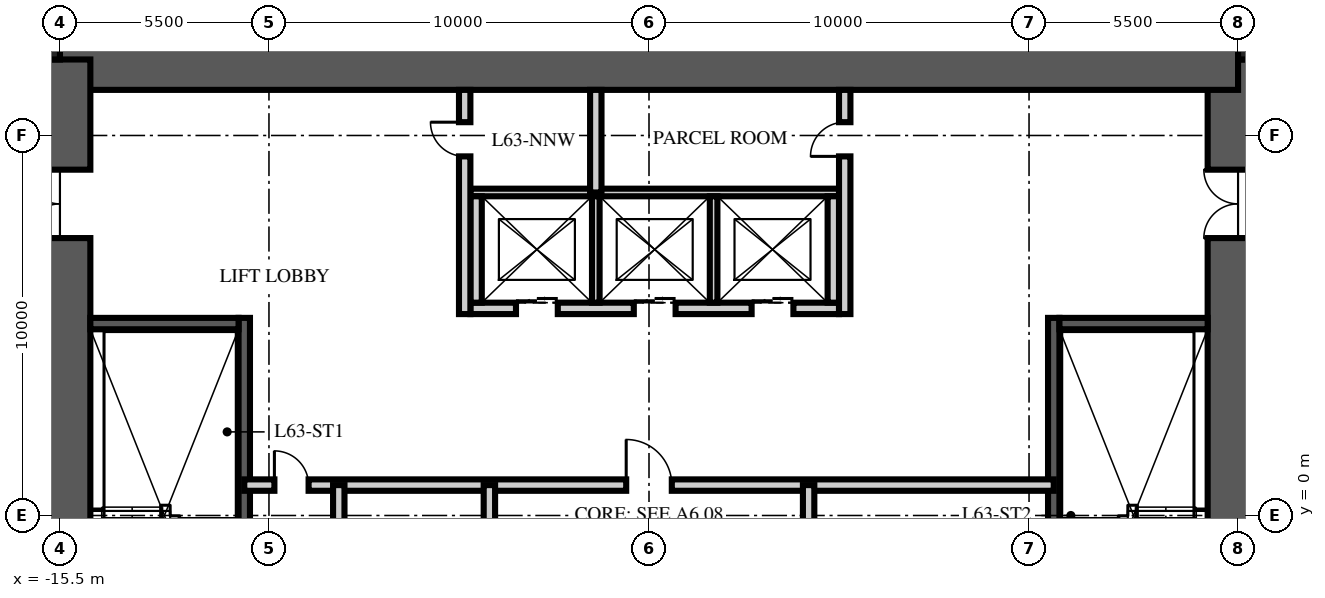
"""IFC4 building model, lengths in metres.
Left out: names, types, materials, properties, quantities, classifications, styles, units other than length and angle.
Written with IfcOpenShell. Run it as: python <this file> out.ifc"""

import sys

from ifc_helpers import new_model, si_unit, direction, frame, frame_2d, origin, origin_2d, place, context, subcontext, project, spatial, rectangle, extrude, element, fill, save


model = new_model("IFC4")
c1 = context("Model", 3, precision=1e-05, world=origin(), true_north=direction((0.0, 1.0)))
c2 = subcontext(c1, "Body", "Model", "MODEL_VIEW")
j1 = project(units=[si_unit("LENGTHUNIT", "METRE"), si_unit("PLANEANGLEUNIT", "RADIAN")], contexts=[c1])
p1 = place(None, origin())
s1 = spatial("IfcSite", under=j1, at=p1, CompositionType="ELEMENT")
p2 = place(p1, origin())
s2 = spatial("IfcBuilding", under=s1, at=p2, CompositionType="ELEMENT")
p3 = place(p2, frame((0.0, 0.0, 252.0)))
s3 = spatial("IfcBuildingStorey", under=s2, at=p3, CompositionType="ELEMENT", Elevation=252.0)
p4 = place(p3, frame((15.5, -12.0, -0.25), z_axis=(0.0, 0.0, 1.0), x_axis=(0.0, 1.0, 0.0)))
e1 = element("IfcWall", 1, at=p4, inside=s3, PredefinedType="SHEAR", context=c2, shape_type="SweptSolid", body=[
    extrude(rectangle(XDim=24.0, YDim=1.6, at=frame_2d((12.0, 0.0))), origin(), (0.0, 0.0, 1.0), 3.75),
])
p5 = place(p4, frame((3.2, 0.0, 0.25)))
e2 = element("IfcOpeningElement", 2, at=p5, cuts=e1, PredefinedType="OPENING", context=c2, shape_type="SweptSolid", body=[
    extrude(rectangle(XDim=1.2, YDim=2.1, at=frame_2d((0.6, 1.05))), frame((0.0, 0.81, 0.0), z_axis=(0.0, -1.0, 0.0), x_axis=(1.0, 0.0, 0.0)), (0.0, 0.0, 1.0), 1.62),
])
p6 = place(p4, frame((19.3, 0.0, 0.25)))
e3 = element("IfcOpeningElement", 3, at=p6, cuts=e1, PredefinedType="OPENING", context=c2, shape_type="SweptSolid", body=[
    extrude(rectangle(XDim=1.8, YDim=2.1, at=frame_2d((0.9, 1.05))), frame((0.0, 0.81, 0.0), z_axis=(0.0, -1.0, 0.0), x_axis=(1.0, 0.0, 0.0)), (0.0, 0.0, 1.0), 1.62),
])
p7 = place(p3, frame((-15.5, 12.0, -0.25), z_axis=(0.0, 0.0, 1.0), x_axis=(1.0, 0.0, 0.0)))
e4 = element("IfcWall", 4, at=p7, inside=s3, PredefinedType="SHEAR", context=c2, shape_type="SweptSolid", body=[
    extrude(rectangle(XDim=31.0, YDim=1.6, at=frame_2d((15.5, 0.0))), origin(), (0.0, 0.0, 1.0), 3.75),
])
p8 = place(p3, frame((-15.5, -12.0, -0.25), z_axis=(0.0, 0.0, 1.0), x_axis=(0.0, 1.0, 0.0)))
e5 = element("IfcWall", 5, at=p8, inside=s3, PredefinedType="SHEAR", context=c2, shape_type="SweptSolid", body=[
    extrude(rectangle(XDim=24.0, YDim=1.6, at=frame_2d((12.0, 0.0))), origin(), (0.0, 0.0, 1.0), 3.75),
])
p9 = place(p8, frame((3.2, 0.0, 0.25)))
e6 = element("IfcOpeningElement", 6, at=p9, cuts=e5, PredefinedType="OPENING", context=c2, shape_type="SweptSolid", body=[
    extrude(rectangle(XDim=1.2, YDim=2.1, at=frame_2d((0.6, 1.05))), frame((0.0, 0.81, 0.0), z_axis=(0.0, -1.0, 0.0), x_axis=(1.0, 0.0, 0.0)), (0.0, 0.0, 1.0), 1.62),
])
p10 = place(p8, frame((19.3, 0.0, 0.25)))
e7 = element("IfcOpeningElement", 7, at=p10, cuts=e5, PredefinedType="OPENING", context=c2, shape_type="SweptSolid", body=[
    extrude(rectangle(XDim=1.8, YDim=2.1, at=frame_2d((0.9, 1.05))), frame((0.0, 0.81, 0.0), z_axis=(0.0, -1.0, 0.0), x_axis=(1.0, 0.0, 0.0)), (0.0, 0.0, 1.0), 1.62),
])
for number, where, z_axis, x_axis in (
    (8, (15.9, 12.4, -0.25), (0.0, 0.0, 1.0), (1.0, 0.0, 0.0)),
    (9, (-15.9, 12.4, -0.25), (0.0, 0.0, 1.0), (1.0, 0.0, 0.0)),
):
    element("IfcColumn", number, at=place(p3, frame(where, z_axis=z_axis, x_axis=x_axis)), inside=s3, PredefinedType="COLUMN", context=c2, shape_type="SweptSolid", body=[
        extrude(rectangle(XDim=0.8, YDim=0.8, at=origin_2d()), origin(), (0.0, 0.0, 1.0), 3.75),
    ])
p11 = place(p3, frame((-10.65, -4.9, 0.0), z_axis=(0.0, 0.0, 1.0), x_axis=(0.0, 1.0, 0.0)))
e10 = element("IfcWall", 10, at=p11, inside=s3, PredefinedType="SOLIDWALL", context=c2, shape_type="SweptSolid", body=[
    extrude(rectangle(XDim=10.1, YDim=0.3, at=frame_2d((5.05, 0.0))), origin(), (0.0, 0.0, 1.0), 3.5),
])
p12 = place(p3, frame((-14.7, 5.05, 0.0), z_axis=(0.0, 0.0, 1.0), x_axis=(1.0, 0.0, 0.0)))
e11 = element("IfcWall", 11, at=p12, inside=s3, PredefinedType="SOLIDWALL", context=c2, shape_type="SweptSolid", body=[
    extrude(rectangle(XDim=3.9, YDim=0.3, at=frame_2d((1.95, 0.0))), origin(), (0.0, 0.0, 1.0), 3.5),
])
p13 = place(p3, frame((10.65, -4.9, 0.0), z_axis=(0.0, 0.0, 1.0), x_axis=(0.0, 1.0, 0.0)))
e12 = element("IfcWall", 12, at=p13, inside=s3, PredefinedType="SOLIDWALL", context=c2, shape_type="SweptSolid", body=[
    extrude(rectangle(XDim=10.1, YDim=0.3, at=frame_2d((5.05, 0.0))), origin(), (0.0, 0.0, 1.0), 3.5),
])
p14 = place(p3, frame((14.7, 5.05, 0.0), z_axis=(0.0, 0.0, 1.0), x_axis=(-1.0, 0.0, 0.0)))
e13 = element("IfcWall", 13, at=p14, inside=s3, PredefinedType="SOLIDWALL", context=c2, shape_type="SweptSolid", body=[
    extrude(rectangle(XDim=3.9, YDim=0.3, at=frame_2d((1.95, 0.0))), origin(), (0.0, 0.0, 1.0), 3.5),
])
p15 = place(p3, frame((-4.7, 5.45, 0.0), z_axis=(0.0, 0.0, 1.0), x_axis=(1.0, 0.0, 0.0)))
e14 = element("IfcWall", 14, at=p15, inside=s3, PredefinedType="PARTITIONING", context=c2, shape_type="SweptSolid", body=[
    extrude(rectangle(XDim=9.7, YDim=0.3, at=frame_2d((4.85, 0.0))), origin(), (0.0, 0.0, 1.0), 3.5),
])
p16 = place(p15, frame((1.2, 0.0, 0.0)))
e15 = element("IfcOpeningElement", 15, at=p16, cuts=e14, PredefinedType="OPENING", context=c2, shape_type="SweptSolid", body=[
    extrude(rectangle(XDim=1.1, YDim=2.1, at=frame_2d((0.55, 1.05))), frame((0.0, 0.16, 0.0), z_axis=(0.0, -1.0, 0.0), x_axis=(1.0, 0.0, 0.0)), (0.0, 0.0, 1.0), 0.32),
])
p17 = place(p15, frame((4.3, 0.0, 0.0)))
e16 = element("IfcOpeningElement", 16, at=p17, cuts=e14, PredefinedType="OPENING", context=c2, shape_type="SweptSolid", body=[
    extrude(rectangle(XDim=1.1, YDim=2.1, at=frame_2d((0.55, 1.05))), frame((0.0, 0.16, 0.0), z_axis=(0.0, -1.0, 0.0), x_axis=(1.0, 0.0, 0.0)), (0.0, 0.0, 1.0), 0.32),
])
p18 = place(p15, frame((7.4, 0.0, 0.0)))
e17 = element("IfcOpeningElement", 17, at=p18, cuts=e14, PredefinedType="OPENING", context=c2, shape_type="SweptSolid", body=[
    extrude(rectangle(XDim=1.1, YDim=2.1, at=frame_2d((0.55, 1.05))), frame((0.0, 0.16, 0.0), z_axis=(0.0, -1.0, 0.0), x_axis=(1.0, 0.0, 0.0)), (0.0, 0.0, 1.0), 0.32),
])
p19 = place(p3, frame((-4.7, 8.5, 0.0), z_axis=(0.0, 0.0, 1.0), x_axis=(1.0, 0.0, 0.0)))
e18 = element("IfcWall", 18, at=p19, inside=s3, PredefinedType="PARTITIONING", context=c2, shape_type="SweptSolid", body=[
    extrude(rectangle(XDim=9.7, YDim=0.2, at=frame_2d((4.85, 0.0))), origin(), (0.0, 0.0, 1.0), 3.5),
])
for number, where, z_axis, x_axis in (
    (19, (-4.55, 5.6, 0.0), (0.0, 0.0, 1.0), (0.0, 1.0, 0.0)),
    (20, (4.85, 5.6, 0.0), (0.0, 0.0, 1.0), (0.0, 1.0, 0.0)),
):
    element("IfcWall", number, at=place(p3, frame(where, z_axis=z_axis, x_axis=x_axis)), inside=s3, PredefinedType="PARTITIONING", context=c2, shape_type="SweptSolid", body=[
        extrude(rectangle(XDim=2.8, YDim=0.3, at=frame_2d((1.4, 0.0))), origin(), (0.0, 0.0, 1.0), 3.5),
    ])
for number, where, z_axis, x_axis in (
    (21, (-1.4, 5.6, 0.0), (0.0, 0.0, 1.0), (0.0, 1.0, 0.0)),
    (22, (1.7, 5.6, 0.0), (0.0, 0.0, 1.0), (0.0, 1.0, 0.0)),
):
    element("IfcWall", number, at=place(p3, frame(where, z_axis=z_axis, x_axis=x_axis)), inside=s3, PredefinedType="PARTITIONING", context=c2, shape_type="SweptSolid", body=[
        extrude(rectangle(XDim=2.8, YDim=0.2, at=frame_2d((1.4, 0.0))), origin(), (0.0, 0.0, 1.0), 3.5),
    ])
p20 = place(p3, frame((-10.65, 0.8, 0.0), z_axis=(0.0, 0.0, 1.0), x_axis=(1.0, 0.0, 0.0)))
e23 = element("IfcWall", 23, at=p20, inside=s3, PredefinedType="PARTITIONING", context=c2, shape_type="SweptSolid", body=[
    extrude(rectangle(XDim=21.3, YDim=0.3, at=frame_2d((10.65, 0.0))), origin(), (0.0, 0.0, 1.0), 3.5),
])
p21 = place(p20, frame((10.05, 0.0, 0.0)))
e24 = element("IfcOpeningElement", 24, at=p21, cuts=e23, PredefinedType="OPENING", context=c2, shape_type="SweptSolid", body=[
    extrude(rectangle(XDim=1.2, YDim=2.1, at=frame_2d((0.6, 1.05))), frame((0.0, 0.16, 0.0), z_axis=(0.0, -1.0, 0.0), x_axis=(1.0, 0.0, 0.0)), (0.0, 0.0, 1.0), 0.32),
])
p22 = place(p20, frame((0.793, 0.0, 0.0)))
e25 = element("IfcOpeningElement", 25, at=p22, cuts=e23, PredefinedType="OPENING", context=c2, shape_type="SweptSolid", body=[
    extrude(rectangle(XDim=0.9, YDim=2.1, at=frame_2d((0.45, 1.05))), frame((0.0, 0.16, 0.0), z_axis=(0.0, -1.0, 0.0), x_axis=(1.0, 0.0, 0.0)), (0.0, 0.0, 1.0), 0.32),
])
p23 = place(p3, frame((-4.2, -6.65, 0.0), z_axis=(0.0, 0.0, 1.0), x_axis=(0.0, 1.0, 0.0)))
e26 = element("IfcWall", 26, at=p23, inside=s3, PredefinedType="PARTITIONING", context=c2, shape_type="SweptSolid", body=[
    extrude(rectangle(XDim=7.45, YDim=0.3, at=frame_2d((3.725, 0.0))), origin(), (0.0, 0.0, 1.0), 3.5),
])
p24 = place(p23, frame((3.275, 0.0, 0.0)))
e27 = element("IfcOpeningElement", 27, at=p24, cuts=e26, PredefinedType="OPENING", context=c2, shape_type="SweptSolid", body=[
    extrude(rectangle(XDim=0.9, YDim=2.1, at=frame_2d((0.45, 1.05))), frame((0.0, 0.16, 0.0), z_axis=(0.0, -1.0, 0.0), x_axis=(1.0, 0.0, 0.0)), (0.0, 0.0, 1.0), 0.32),
])
p25 = place(p3, frame((4.2, -6.65, 0.0), z_axis=(0.0, 0.0, 1.0), x_axis=(0.0, 1.0, 0.0)))
e28 = element("IfcWall", 28, at=p25, inside=s3, PredefinedType="PARTITIONING", context=c2, shape_type="SweptSolid", body=[
    extrude(rectangle(XDim=7.45, YDim=0.3, at=frame_2d((3.725, 0.0))), origin(), (0.0, 0.0, 1.0), 3.5),
])
p26 = place(p25, frame((0.866, 0.0, 0.0)))
e29 = element("IfcOpeningElement", 29, at=p26, cuts=e28, PredefinedType="OPENING", context=c2, shape_type="SweptSolid", body=[
    extrude(rectangle(XDim=0.9, YDim=2.1, at=frame_2d((0.45, 1.05))), frame((0.0, 0.16, 0.0), z_axis=(0.0, -1.0, 0.0), x_axis=(1.0, 0.0, 0.0)), (0.0, 0.0, 1.0), 0.32),
])
p27 = place(p25, frame((4.591, 0.0, 0.0)))
e30 = element("IfcOpeningElement", 30, at=p27, cuts=e28, PredefinedType="OPENING", context=c2, shape_type="SweptSolid", body=[
    extrude(rectangle(XDim=0.9, YDim=2.1, at=frame_2d((0.45, 1.05))), frame((0.0, 0.16, 0.0), z_axis=(0.0, -1.0, 0.0), x_axis=(1.0, 0.0, 0.0)), (0.0, 0.0, 1.0), 0.32),
])
p28 = place(p3, frame((-8.163, -6.65, 0.0), z_axis=(0.0, 0.0, 1.0), x_axis=(0.0, 1.0, 0.0)))
e31 = element("IfcWall", 31, at=p28, inside=s3, PredefinedType="PARTITIONING", context=c2, shape_type="SweptSolid", body=[
    extrude(rectangle(XDim=7.45, YDim=0.3, at=frame_2d((3.725, 0.0))), origin(), (0.0, 0.0, 1.0), 3.5),
])
p29 = place(p3, frame((-4.85, 5.3, 0.0), z_axis=(0.0, 0.0, 1.0), x_axis=(0.0, 1.0, 0.0)))
e32 = element("IfcWall", 32, at=p29, inside=s3, PredefinedType="PARTITIONING", context=c2, shape_type="SweptSolid", body=[
    extrude(rectangle(XDim=5.9, YDim=0.3, at=frame_2d((2.95, 0.0))), origin(), (0.0, 0.0, 1.0), 3.5),
])
p30 = place(p29, frame((4.15, 0.0, 0.0)))
e33 = element("IfcOpeningElement", 33, at=p30, cuts=e32, PredefinedType="OPENING", context=c2, shape_type="SweptSolid", body=[
    extrude(rectangle(XDim=0.9, YDim=2.1, at=frame_2d((0.45, 1.05))), frame((0.0, 0.16, 0.0), z_axis=(0.0, -1.0, 0.0), x_axis=(1.0, 0.0, 0.0)), (0.0, 0.0, 1.0), 0.32),
])
p31 = place(p3, frame((5.15, 5.3, 0.0), z_axis=(0.0, 0.0, 1.0), x_axis=(0.0, 1.0, 0.0)))
e34 = element("IfcWall", 34, at=p31, inside=s3, PredefinedType="PARTITIONING", context=c2, shape_type="SweptSolid", body=[
    extrude(rectangle(XDim=5.9, YDim=0.3, at=frame_2d((2.95, 0.0))), origin(), (0.0, 0.0, 1.0), 3.5),
])
p32 = place(p31, frame((4.15, 0.0, 0.0)))
e35 = element("IfcOpeningElement", 35, at=p32, cuts=e34, PredefinedType="OPENING", context=c2, shape_type="SweptSolid", body=[
    extrude(rectangle(XDim=0.9, YDim=2.1, at=frame_2d((0.45, 1.05))), frame((0.0, 0.16, 0.0), z_axis=(0.0, -1.0, 0.0), x_axis=(1.0, 0.0, 0.0)), (0.0, 0.0, 1.0), 0.32),
])
p33 = place(p3, frame((-1.4, 8.5, 0.0), z_axis=(0.0, 0.0, 1.0), x_axis=(0.0, 1.0, 0.0)))
e36 = element("IfcWall", 36, at=p33, inside=s3, PredefinedType="PARTITIONING", context=c2, shape_type="SweptSolid", body=[
    extrude(rectangle(XDim=2.7, YDim=0.3, at=frame_2d((1.35, 0.0))), origin(), (0.0, 0.0, 1.0), 3.5),
])
p34 = place(p10, origin())
e37 = element("IfcDoor", 37, at=p34, inside=s3, OperationType="DOUBLE_DOOR_SINGLE_SWING", PredefinedType="DOOR", context=c2, shape_type="SweptSolid", body=[
    extrude(rectangle(XDim=1.8, YDim=2.1, at=frame_2d((0.9, 1.05))), frame((0.0, 0.025, 0.0), z_axis=(0.0, -1.0, 0.0), x_axis=(1.0, 0.0, 0.0)), (0.0, 0.0, 1.0), 0.05),
])
fill(e7, e37)
p35 = place(p6, origin())
e38 = element("IfcDoor", 38, at=p35, inside=s3, OperationType="DOUBLE_DOOR_SINGLE_SWING", PredefinedType="DOOR", context=c2, shape_type="SweptSolid", body=[
    extrude(rectangle(XDim=1.8, YDim=2.1, at=frame_2d((0.9, 1.05))), frame((0.0, 0.025, 0.0), z_axis=(0.0, -1.0, 0.0), x_axis=(1.0, 0.0, 0.0)), (0.0, 0.0, 1.0), 0.05),
])
fill(e3, e38)
p36 = place(p16, origin())
e39 = element("IfcDoor", 39, at=p36, inside=s3, OperationType="DOUBLE_DOOR_SLIDING", PredefinedType="DOOR", context=c2, shape_type="SweptSolid", body=[
    extrude(rectangle(XDim=1.1, YDim=2.1, at=frame_2d((0.55, 1.05))), frame((0.0, 0.025, 0.0), z_axis=(0.0, -1.0, 0.0), x_axis=(1.0, 0.0, 0.0)), (0.0, 0.0, 1.0), 0.05),
])
fill(e15, e39)
p37 = place(p17, origin())
e40 = element("IfcDoor", 40, at=p37, inside=s3, OperationType="DOUBLE_DOOR_SLIDING", PredefinedType="DOOR", context=c2, shape_type="SweptSolid", body=[
    extrude(rectangle(XDim=1.1, YDim=2.1, at=frame_2d((0.55, 1.05))), frame((0.0, 0.025, 0.0), z_axis=(0.0, -1.0, 0.0), x_axis=(1.0, 0.0, 0.0)), (0.0, 0.0, 1.0), 0.05),
])
fill(e16, e40)
p38 = place(p18, origin())
e41 = element("IfcDoor", 41, at=p38, inside=s3, OperationType="DOUBLE_DOOR_SLIDING", PredefinedType="DOOR", context=c2, shape_type="SweptSolid", body=[
    extrude(rectangle(XDim=1.1, YDim=2.1, at=frame_2d((0.55, 1.05))), frame((0.0, 0.025, 0.0), z_axis=(0.0, -1.0, 0.0), x_axis=(1.0, 0.0, 0.0)), (0.0, 0.0, 1.0), 0.05),
])
fill(e17, e41)
p39 = place(p21, origin())
e42 = element("IfcDoor", 42, at=p39, inside=s3, OperationType="SINGLE_SWING_LEFT", PredefinedType="DOOR", context=c2, shape_type="SweptSolid", body=[
    extrude(rectangle(XDim=1.2, YDim=2.1, at=frame_2d((0.6, 1.05))), frame((0.0, 0.025, 0.0), z_axis=(0.0, -1.0, 0.0), x_axis=(1.0, 0.0, 0.0)), (0.0, 0.0, 1.0), 0.05),
])
fill(e24, e42)
p40 = place(p22, origin())
e43 = element("IfcDoor", 43, at=p40, inside=s3, OperationType="SINGLE_SWING_LEFT", PredefinedType="DOOR", context=c2, shape_type="SweptSolid", body=[
    extrude(rectangle(XDim=0.9, YDim=2.1, at=frame_2d((0.45, 1.05))), frame((0.0, 0.025, 0.0), z_axis=(0.0, -1.0, 0.0), x_axis=(1.0, 0.0, 0.0)), (0.0, 0.0, 1.0), 0.05),
])
fill(e25, e43)
p41 = place(p30, origin())
e44 = element("IfcDoor", 44, at=p41, inside=s3, OperationType="SINGLE_SWING_RIGHT", PredefinedType="DOOR", context=c2, shape_type="SweptSolid", body=[
    extrude(rectangle(XDim=0.9, YDim=2.1, at=frame_2d((0.45, 1.05))), frame((0.0, 0.025, 0.0), z_axis=(0.0, -1.0, 0.0), x_axis=(1.0, 0.0, 0.0)), (0.0, 0.0, 1.0), 0.05),
])
fill(e33, e44)
p42 = place(p32, origin())
e45 = element("IfcDoor", 45, at=p42, inside=s3, OperationType="SINGLE_SWING_LEFT", PredefinedType="DOOR", context=c2, shape_type="SweptSolid", body=[
    extrude(rectangle(XDim=0.9, YDim=2.1, at=frame_2d((0.45, 1.05))), frame((0.0, 0.025, 0.0), z_axis=(0.0, -1.0, 0.0), x_axis=(1.0, 0.0, 0.0)), (0.0, 0.0, 1.0), 0.05),
])
fill(e35, e45)
save(model, sys.argv[1])
